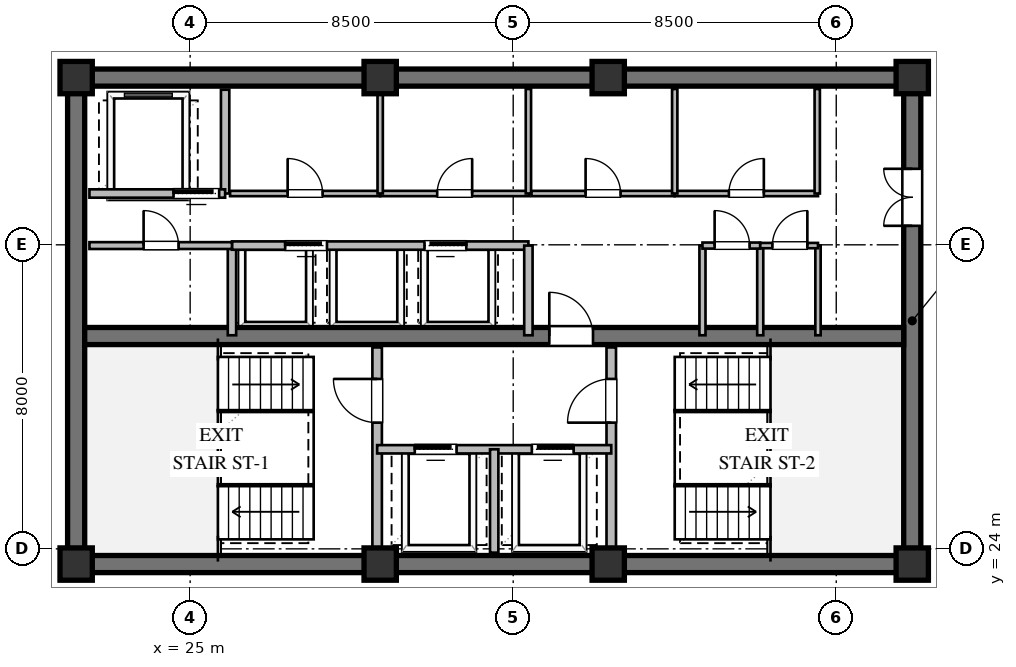
"""IFC4 building model, lengths in metres.
Left out: names, types, materials, properties, quantities, classifications, styles, units other than length and angle.
Written with IfcOpenShell. Run it as: python <this file> out.ifc"""

import sys

from ifc_helpers import new_model, si_unit, direction, frame, frame_2d, origin, origin_2d, place, context, subcontext, project, spatial, rectangle, extrude, element, fill, save


model = new_model("IFC4")
c1 = context("Model", 3, precision=1e-05, world=origin(), true_north=direction((0.0, 1.0)))
c2 = subcontext(c1, "Body", "Model", "MODEL_VIEW")
j1 = project(units=[si_unit("LENGTHUNIT", "METRE"), si_unit("PLANEANGLEUNIT", "RADIAN")], contexts=[c1])
p1 = place(None, origin())
s1 = spatial("IfcSite", under=j1, at=p1, CompositionType="ELEMENT")
p2 = place(p1, origin())
s2 = spatial("IfcBuilding", under=s1, at=p2, CompositionType="ELEMENT")
p3 = place(p2, frame((0.0, 0.0, 228.0)))
s3 = spatial("IfcBuildingStorey", under=s2, at=p3, CompositionType="ELEMENT", Elevation=228.0)
for number, where, z_axis, x_axis in (
    (1, (21.775, 23.6, 0.0), (0.0, 0.0, 1.0), (1.0, 0.0, 0.0)),
    (2, (21.775, 36.4, 0.0), (0.0, 0.0, 1.0), (1.0, 0.0, 0.0)),
):
    element("IfcWall", number, at=place(p3, frame(where, z_axis=z_axis, x_axis=x_axis)), inside=s3, PredefinedType="SHEAR", context=c2, shape_type="SweptSolid", body=[
        extrude(rectangle(XDim=22.45, YDim=0.45, at=frame_2d((11.225, 0.0))), origin(), (0.0, 0.0, 1.0), 3.36),
    ])
p4 = place(p3, frame((22.0, 23.825, 0.0), z_axis=(0.0, 0.0, 1.0), x_axis=(0.0, 1.0, 0.0)))
e3 = element("IfcWall", 3, at=p4, inside=s3, PredefinedType="SHEAR", context=c2, shape_type="SweptSolid", body=[
    extrude(rectangle(XDim=12.35, YDim=0.45, at=frame_2d((6.175, 0.0))), origin(), (0.0, 0.0, 1.0), 3.36),
])
p5 = place(p3, frame((44.0, 23.825, 0.0), z_axis=(0.0, 0.0, 1.0), x_axis=(0.0, 1.0, 0.0)))
e4 = element("IfcWall", 4, at=p5, inside=s3, PredefinedType="SHEAR", context=c2, shape_type="SweptSolid", body=[
    extrude(rectangle(XDim=12.35, YDim=0.45, at=frame_2d((6.175, 0.0))), origin(), (0.0, 0.0, 1.0), 3.36),
])
p6 = place(p5, frame((8.675, 0.0, 0.0)))
e5 = element("IfcOpeningElement", 5, at=p6, cuts=e4, PredefinedType="OPENING", context=c2, shape_type="SweptSolid", body=[
    extrude(rectangle(XDim=1.5, YDim=2.15, at=frame_2d((0.75, 1.075))), frame((0.0, 0.235, 0.0), z_axis=(0.0, -1.0, 0.0), x_axis=(1.0, 0.0, 0.0)), (0.0, 0.0, 1.0), 0.47),
])
p7 = place(p3, frame((22.225, 29.6, 0.0), z_axis=(0.0, 0.0, 1.0), x_axis=(1.0, 0.0, 0.0)))
e6 = element("IfcWall", 6, at=p7, inside=s3, PredefinedType="SHEAR", context=c2, shape_type="SweptSolid", body=[
    extrude(rectangle(XDim=21.55, YDim=0.45, at=frame_2d((10.775, 0.0))), origin(), (0.0, 0.0, 1.0), 3.36),
])
p8 = place(p7, frame((12.225, 0.0, 0.0)))
e7 = element("IfcOpeningElement", 7, at=p8, cuts=e6, PredefinedType="OPENING", context=c2, shape_type="SweptSolid", body=[
    extrude(rectangle(XDim=1.15, YDim=2.1, at=frame_2d((0.575, 1.05))), frame((0.0, 0.235, 0.0), z_axis=(0.0, -1.0, 0.0), x_axis=(1.0, 0.0, 0.0)), (0.0, 0.0, 1.0), 0.47),
])
for number, where, z_axis, x_axis in (
    (8, (22.0, 23.6, 0.0), (0.0, 0.0, 1.0), (1.0, 0.0, 0.0)),
    (9, (30.0, 23.6, 0.0), (0.0, 0.0, 1.0), (1.0, 0.0, 0.0)),
    (10, (36.0, 23.6, 0.0), (0.0, 0.0, 1.0), (1.0, 0.0, 0.0)),
    (11, (44.0, 23.6, 0.0), (0.0, 0.0, 1.0), (1.0, 0.0, 0.0)),
    (12, (44.0, 36.4, 0.0), (0.0, 0.0, 1.0), (1.0, 0.0, 0.0)),
    (13, (36.0, 36.4, 0.0), (0.0, 0.0, 1.0), (1.0, 0.0, 0.0)),
    (14, (30.0, 36.4, 0.0), (0.0, 0.0, 1.0), (1.0, 0.0, 0.0)),
    (15, (22.0, 36.4, 0.0), (0.0, 0.0, 1.0), (1.0, 0.0, 0.0)),
):
    element("IfcColumn", number, at=place(p3, frame(where, z_axis=z_axis, x_axis=x_axis)), inside=s3, PredefinedType="COLUMN", context=c2, shape_type="SweptSolid", body=[
        extrude(rectangle(XDim=0.85, YDim=0.85, at=origin_2d()), origin(), (0.0, 0.0, 1.0), 3.6),
    ])
p9 = place(p3, frame((29.92, 23.9, 0.0), z_axis=(0.0, 0.0, 1.0), x_axis=(0.0, 1.0, 0.0)))
e16 = element("IfcWall", 16, at=p9, inside=s3, PredefinedType="SOLIDWALL", context=c2, shape_type="SweptSolid", body=[
    extrude(rectangle(XDim=5.4, YDim=0.25, at=frame_2d((2.7, 0.0))), origin(), (0.0, 0.0, 1.0), 3.36),
])
p10 = place(p9, frame((3.421, 0.0, 0.0)))
e17 = element("IfcOpeningElement", 17, at=p10, cuts=e16, PredefinedType="OPENING", context=c2, shape_type="SweptSolid", body=[
    extrude(rectangle(XDim=1.15, YDim=2.1, at=frame_2d((0.575, 1.05))), frame((0.0, 0.135, 0.0), z_axis=(0.0, -1.0, 0.0), x_axis=(1.0, 0.0, 0.0)), (0.0, 0.0, 1.0), 0.27),
])
p11 = place(p3, frame((36.08, 23.9, 0.0), z_axis=(0.0, 0.0, 1.0), x_axis=(0.0, 1.0, 0.0)))
e18 = element("IfcWall", 18, at=p11, inside=s3, PredefinedType="SOLIDWALL", context=c2, shape_type="SweptSolid", body=[
    extrude(rectangle(XDim=5.4, YDim=0.25, at=frame_2d((2.7, 0.0))), origin(), (0.0, 0.0, 1.0), 3.36),
])
p12 = place(p11, frame((3.421, 0.0, 0.0)))
e19 = element("IfcOpeningElement", 19, at=p12, cuts=e18, PredefinedType="OPENING", context=c2, shape_type="SweptSolid", body=[
    extrude(rectangle(XDim=1.15, YDim=2.1, at=frame_2d((0.575, 1.05))), frame((0.0, 0.135, 0.0), z_axis=(0.0, -1.0, 0.0), x_axis=(1.0, 0.0, 0.0)), (0.0, 0.0, 1.0), 0.27),
])
p13 = place(p3, frame((29.92, 26.62, 0.0), z_axis=(0.0, 0.0, 1.0), x_axis=(1.0, 0.0, 0.0)))
e20 = element("IfcWall", 20, at=p13, inside=s3, PredefinedType="SOLIDWALL", context=c2, shape_type="SweptSolid", body=[
    extrude(rectangle(XDim=6.16, YDim=0.22, at=frame_2d((3.08, 0.0))), origin(), (0.0, 0.0, 1.0), 3.36),
])
p14 = place(p13, frame((0.99, 0.0, 0.0)))
e21 = element("IfcOpeningElement", 21, at=p14, cuts=e20, PredefinedType="OPENING", context=c2, shape_type="SweptSolid", body=[
    extrude(rectangle(XDim=1.1, YDim=2.1, at=frame_2d((0.55, 1.05))), frame((0.0, 0.12, 0.0), z_axis=(0.0, -1.0, 0.0), x_axis=(1.0, 0.0, 0.0)), (0.0, 0.0, 1.0), 0.24),
])
p15 = place(p13, frame((4.07, 0.0, 0.0)))
e22 = element("IfcOpeningElement", 22, at=p15, cuts=e20, PredefinedType="OPENING", context=c2, shape_type="SweptSolid", body=[
    extrude(rectangle(XDim=1.1, YDim=2.1, at=frame_2d((0.55, 1.05))), frame((0.0, 0.12, 0.0), z_axis=(0.0, -1.0, 0.0), x_axis=(1.0, 0.0, 0.0)), (0.0, 0.0, 1.0), 0.24),
])
p16 = place(p3, frame((33.0, 23.9, 0.0), z_axis=(0.0, 0.0, 1.0), x_axis=(0.0, 1.0, 0.0)))
e23 = element("IfcWall", 23, at=p16, inside=s3, PredefinedType="SOLIDWALL", context=c2, shape_type="SweptSolid", body=[
    extrude(rectangle(XDim=2.72, YDim=0.22, at=frame_2d((1.36, 0.0))), origin(), (0.0, 0.0, 1.0), 3.36),
])
p17 = place(p3, frame((25.92, 33.35, 0.0), z_axis=(0.0, 0.0, 1.0), x_axis=(0.0, 1.0, 0.0)))
e24 = element("IfcWall", 24, at=p17, inside=s3, PredefinedType="SOLIDWALL", context=c2, shape_type="SweptSolid", body=[
    extrude(rectangle(XDim=2.73, YDim=0.22, at=frame_2d((1.365, 0.0))), origin(), (0.0, 0.0, 1.0), 3.36),
])
p18 = place(p3, frame((22.35, 33.35, 0.0), z_axis=(0.0, 0.0, 1.0), x_axis=(1.0, 0.0, 0.0)))
e25 = element("IfcWall", 25, at=p18, inside=s3, PredefinedType="SOLIDWALL", context=c2, shape_type="SweptSolid", body=[
    extrude(rectangle(XDim=3.57, YDim=0.22, at=frame_2d((1.785, 0.0))), origin(), (0.0, 0.0, 1.0), 3.36),
])
p19 = place(p18, frame((2.213, 0.0, 0.0)))
e26 = element("IfcOpeningElement", 26, at=p19, cuts=e25, PredefinedType="OPENING", context=c2, shape_type="SweptSolid", body=[
    extrude(rectangle(XDim=1.2, YDim=2.1, at=frame_2d((0.6, 1.05))), frame((0.0, 0.12, 0.0), z_axis=(0.0, -1.0, 0.0), x_axis=(1.0, 0.0, 0.0)), (0.0, 0.0, 1.0), 0.24),
])
p20 = place(p3, frame((26.1, 29.62, 0.0), z_axis=(0.0, 0.0, 1.0), x_axis=(0.0, 1.0, 0.0)))
e27 = element("IfcWall", 27, at=p20, inside=s3, PredefinedType="SOLIDWALL", context=c2, shape_type="SweptSolid", body=[
    extrude(rectangle(XDim=2.36, YDim=0.22, at=frame_2d((1.18, 0.0))), origin(), (0.0, 0.0, 1.0), 3.36),
])
p21 = place(p3, frame((26.1, 31.98, 0.0), z_axis=(0.0, 0.0, 1.0), x_axis=(1.0, 0.0, 0.0)))
e28 = element("IfcWall", 28, at=p21, inside=s3, PredefinedType="SOLIDWALL", context=c2, shape_type="SweptSolid", body=[
    extrude(rectangle(XDim=7.8, YDim=0.22, at=frame_2d((3.9, 0.0))), origin(), (0.0, 0.0, 1.0), 3.36),
])
p22 = place(p21, frame((1.4, 0.0, 0.0)))
e29 = element("IfcOpeningElement", 29, at=p22, cuts=e28, PredefinedType="OPENING", context=c2, shape_type="SweptSolid", body=[
    extrude(rectangle(XDim=1.1, YDim=2.1, at=frame_2d((0.55, 1.05))), frame((0.0, 0.12, 0.0), z_axis=(0.0, -1.0, 0.0), x_axis=(1.0, 0.0, 0.0)), (0.0, 0.0, 1.0), 0.24),
])
p23 = place(p21, frame((5.066, 0.0, 0.0)))
e30 = element("IfcOpeningElement", 30, at=p23, cuts=e28, PredefinedType="OPENING", context=c2, shape_type="SweptSolid", body=[
    extrude(rectangle(XDim=1.1, YDim=2.1, at=frame_2d((0.55, 1.05))), frame((0.0, 0.12, 0.0), z_axis=(0.0, -1.0, 0.0), x_axis=(1.0, 0.0, 0.0)), (0.0, 0.0, 1.0), 0.24),
])
p24 = place(p3, frame((33.9, 29.62, 0.0), z_axis=(0.0, 0.0, 1.0), x_axis=(0.0, 1.0, 0.0)))
e31 = element("IfcWall", 31, at=p24, inside=s3, PredefinedType="SOLIDWALL", context=c2, shape_type="SweptSolid", body=[
    extrude(rectangle(XDim=2.36, YDim=0.22, at=frame_2d((1.18, 0.0))), origin(), (0.0, 0.0, 1.0), 3.36),
])
p25 = place(p3, frame((26.05, 33.35, 0.0), z_axis=(0.0, 0.0, 1.0), x_axis=(1.0, 0.0, 0.0)))
e32 = element("IfcWall", 32, at=p25, inside=s3, PredefinedType="PARTITIONING", context=c2, shape_type="SweptSolid", body=[
    extrude(rectangle(XDim=3.95, YDim=0.14, at=frame_2d((1.975, 0.0))), origin(), (0.0, 0.0, 1.0), 3.36),
])
p26 = place(p25, frame((1.515, 0.0, 0.0)))
e33 = element("IfcOpeningElement", 33, at=p26, cuts=e32, PredefinedType="OPENING", context=c2, shape_type="SweptSolid", body=[
    extrude(rectangle(XDim=0.92, YDim=2.1, at=frame_2d((0.46, 1.05))), frame((0.0, 0.08, 0.0), z_axis=(0.0, -1.0, 0.0), x_axis=(1.0, 0.0, 0.0)), (0.0, 0.0, 1.0), 0.16),
])
p27 = place(p3, frame((30.0, 33.35, 0.0), z_axis=(0.0, 0.0, 1.0), x_axis=(1.0, 0.0, 0.0)))
e34 = element("IfcWall", 34, at=p27, inside=s3, PredefinedType="PARTITIONING", context=c2, shape_type="SweptSolid", body=[
    extrude(rectangle(XDim=3.92, YDim=0.14, at=frame_2d((1.96, 0.0))), origin(), (0.0, 0.0, 1.0), 3.36),
])
p28 = place(p27, frame((1.5, 0.0, 0.0)))
e35 = element("IfcOpeningElement", 35, at=p28, cuts=e34, PredefinedType="OPENING", context=c2, shape_type="SweptSolid", body=[
    extrude(rectangle(XDim=0.92, YDim=2.1, at=frame_2d((0.46, 1.05))), frame((0.0, 0.08, 0.0), z_axis=(0.0, -1.0, 0.0), x_axis=(1.0, 0.0, 0.0)), (0.0, 0.0, 1.0), 0.16),
])
for number, where, z_axis, x_axis in (
    (36, (30.0, 33.35, 0.0), (0.0, 0.0, 1.0), (0.0, 1.0, 0.0)),
    (37, (33.9, 33.35, 0.0), (0.0, 0.0, 1.0), (0.0, 1.0, 0.0)),
):
    element("IfcWall", number, at=place(p3, frame(where, z_axis=z_axis, x_axis=x_axis)), inside=s3, PredefinedType="PARTITIONING", context=c2, shape_type="SweptSolid", body=[
        extrude(rectangle(XDim=2.75, YDim=0.14, at=frame_2d((1.375, 0.0))), origin(), (0.0, 0.0, 1.0), 3.36),
    ])
p29 = place(p3, frame((33.98, 33.35, 0.0), z_axis=(0.0, 0.0, 1.0), x_axis=(1.0, 0.0, 0.0)))
e38 = element("IfcWall", 38, at=p29, inside=s3, PredefinedType="PARTITIONING", context=c2, shape_type="SweptSolid", body=[
    extrude(rectangle(XDim=3.77, YDim=0.14, at=frame_2d((1.885, 0.0))), origin(), (0.0, 0.0, 1.0), 3.36),
])
p30 = place(p29, frame((1.425, 0.0, 0.0)))
e39 = element("IfcOpeningElement", 39, at=p30, cuts=e38, PredefinedType="OPENING", context=c2, shape_type="SweptSolid", body=[
    extrude(rectangle(XDim=0.92, YDim=2.1, at=frame_2d((0.46, 1.05))), frame((0.0, 0.08, 0.0), z_axis=(0.0, -1.0, 0.0), x_axis=(1.0, 0.0, 0.0)), (0.0, 0.0, 1.0), 0.16),
])
p31 = place(p3, frame((37.75, 33.35, 0.0), z_axis=(0.0, 0.0, 1.0), x_axis=(1.0, 0.0, 0.0)))
e40 = element("IfcWall", 40, at=p31, inside=s3, PredefinedType="PARTITIONING", context=c2, shape_type="SweptSolid", body=[
    extrude(rectangle(XDim=3.77, YDim=0.14, at=frame_2d((1.885, 0.0))), origin(), (0.0, 0.0, 1.0), 3.36),
])
p32 = place(p31, frame((1.425, 0.0, 0.0)))
e41 = element("IfcOpeningElement", 41, at=p32, cuts=e40, PredefinedType="OPENING", context=c2, shape_type="SweptSolid", body=[
    extrude(rectangle(XDim=0.92, YDim=2.1, at=frame_2d((0.46, 1.05))), frame((0.0, 0.08, 0.0), z_axis=(0.0, -1.0, 0.0), x_axis=(1.0, 0.0, 0.0)), (0.0, 0.0, 1.0), 0.16),
])
for number, where, z_axis, x_axis in (
    (42, (37.75, 33.35, 0.0), (0.0, 0.0, 1.0), (0.0, 1.0, 0.0)),
    (43, (41.5, 33.35, 0.0), (0.0, 0.0, 1.0), (0.0, 1.0, 0.0)),
):
    element("IfcWall", number, at=place(p3, frame(where, z_axis=z_axis, x_axis=x_axis)), inside=s3, PredefinedType="PARTITIONING", context=c2, shape_type="SweptSolid", body=[
        extrude(rectangle(XDim=2.75, YDim=0.14, at=frame_2d((1.375, 0.0))), origin(), (0.0, 0.0, 1.0), 3.36),
    ])
p33 = place(p3, frame((22.35, 31.98, 0.0), z_axis=(0.0, 0.0, 1.0), x_axis=(1.0, 0.0, 0.0)))
e44 = element("IfcWall", 44, at=p33, inside=s3, PredefinedType="PARTITIONING", context=c2, shape_type="SweptSolid", body=[
    extrude(rectangle(XDim=3.75, YDim=0.18, at=frame_2d((1.875, 0.0))), origin(), (0.0, 0.0, 1.0), 3.36),
])
p34 = place(p33, frame((1.425, 0.0, 0.0)))
e45 = element("IfcOpeningElement", 45, at=p34, cuts=e44, PredefinedType="OPENING", context=c2, shape_type="SweptSolid", body=[
    extrude(rectangle(XDim=0.92, YDim=2.1, at=frame_2d((0.46, 1.05))), frame((0.0, 0.1, 0.0), z_axis=(0.0, -1.0, 0.0), x_axis=(1.0, 0.0, 0.0)), (0.0, 0.0, 1.0), 0.2),
])
for number, where, z_axis, x_axis in (
    (46, (38.48, 29.62, 0.0), (0.0, 0.0, 1.0), (0.0, 1.0, 0.0)),
    (47, (40.0, 29.62, 0.0), (0.0, 0.0, 1.0), (0.0, 1.0, 0.0)),
):
    element("IfcWall", number, at=place(p3, frame(where, z_axis=z_axis, x_axis=x_axis)), inside=s3, PredefinedType="PLUMBINGWALL", context=c2, shape_type="SweptSolid", body=[
        extrude(rectangle(XDim=2.36, YDim=0.16, at=frame_2d((1.18, 0.0))), origin(), (0.0, 0.0, 1.0), 3.36),
    ])
p35 = place(p3, frame((41.52, 29.62, 0.0), z_axis=(0.0, 0.0, 1.0), x_axis=(0.0, 1.0, 0.0)))
e48 = element("IfcWall", 48, at=p35, inside=s3, PredefinedType="PARTITIONING", context=c2, shape_type="SweptSolid", body=[
    extrude(rectangle(XDim=2.36, YDim=0.14, at=frame_2d((1.18, 0.0))), origin(), (0.0, 0.0, 1.0), 3.36),
])
p36 = place(p3, frame((38.48, 31.98, 0.0), z_axis=(0.0, 0.0, 1.0), x_axis=(1.0, 0.0, 0.0)))
e49 = element("IfcWall", 49, at=p36, inside=s3, PredefinedType="PLUMBINGWALL", context=c2, shape_type="SweptSolid", body=[
    extrude(rectangle(XDim=1.52, YDim=0.16, at=frame_2d((0.76, 0.0))), origin(), (0.0, 0.0, 1.0), 3.36),
])
p37 = place(p36, frame((0.32, 0.0, 0.0)))
e50 = element("IfcOpeningElement", 50, at=p37, cuts=e49, PredefinedType="OPENING", context=c2, shape_type="SweptSolid", body=[
    extrude(rectangle(XDim=0.92, YDim=2.1, at=frame_2d((0.46, 1.05))), frame((0.0, 0.09, 0.0), z_axis=(0.0, -1.0, 0.0), x_axis=(1.0, 0.0, 0.0)), (0.0, 0.0, 1.0), 0.18),
])
p38 = place(p3, frame((40.0, 31.98, 0.0), z_axis=(0.0, 0.0, 1.0), x_axis=(1.0, 0.0, 0.0)))
e51 = element("IfcWall", 51, at=p38, inside=s3, PredefinedType="PARTITIONING", context=c2, shape_type="SweptSolid", body=[
    extrude(rectangle(XDim=1.52, YDim=0.14, at=frame_2d((0.76, 0.0))), origin(), (0.0, 0.0, 1.0), 3.36),
])
p39 = place(p38, frame((0.32, 0.0, 0.0)))
e52 = element("IfcOpeningElement", 52, at=p39, cuts=e51, PredefinedType="OPENING", context=c2, shape_type="SweptSolid", body=[
    extrude(rectangle(XDim=0.92, YDim=2.1, at=frame_2d((0.46, 1.05))), frame((0.0, 0.08, 0.0), z_axis=(0.0, -1.0, 0.0), x_axis=(1.0, 0.0, 0.0)), (0.0, 0.0, 1.0), 0.16),
])
p40 = place(p10, origin())
e53 = element("IfcDoor", 53, at=p40, inside=s3, OperationType="SINGLE_SWING_RIGHT", PredefinedType="DOOR", context=c2, shape_type="SweptSolid", body=[
    extrude(rectangle(XDim=1.15, YDim=2.1, at=frame_2d((0.575, 1.05))), frame((0.0, 0.025, 0.0), z_axis=(0.0, -1.0, 0.0), x_axis=(1.0, 0.0, 0.0)), (0.0, 0.0, 1.0), 0.05),
])
fill(e17, e53)
p41 = place(p12, origin())
e54 = element("IfcDoor", 54, at=p41, inside=s3, OperationType="SINGLE_SWING_LEFT", PredefinedType="DOOR", context=c2, shape_type="SweptSolid", body=[
    extrude(rectangle(XDim=1.15, YDim=2.1, at=frame_2d((0.575, 1.05))), frame((0.0, 0.025, 0.0), z_axis=(0.0, -1.0, 0.0), x_axis=(1.0, 0.0, 0.0)), (0.0, 0.0, 1.0), 0.05),
])
fill(e19, e54)
p42 = place(p14, origin())
e55 = element("IfcDoor", 55, at=p42, inside=s3, OperationType="SLIDING_TO_LEFT", PredefinedType="DOOR", context=c2, shape_type="SweptSolid", body=[
    extrude(rectangle(XDim=1.1, YDim=2.1, at=frame_2d((0.55, 1.05))), frame((0.0, 0.025, 0.0), z_axis=(0.0, -1.0, 0.0), x_axis=(1.0, 0.0, 0.0)), (0.0, 0.0, 1.0), 0.05),
])
fill(e21, e55)
p43 = place(p15, origin())
e56 = element("IfcDoor", 56, at=p43, inside=s3, OperationType="SLIDING_TO_RIGHT", PredefinedType="DOOR", context=c2, shape_type="SweptSolid", body=[
    extrude(rectangle(XDim=1.1, YDim=2.1, at=frame_2d((0.55, 1.05))), frame((0.0, 0.025, 0.0), z_axis=(0.0, -1.0, 0.0), x_axis=(1.0, 0.0, 0.0)), (0.0, 0.0, 1.0), 0.05),
])
fill(e22, e56)
p44 = place(p8, origin())
e57 = element("IfcDoor", 57, at=p44, inside=s3, OperationType="SINGLE_SWING_LEFT", PredefinedType="DOOR", context=c2, shape_type="SweptSolid", body=[
    extrude(rectangle(XDim=1.15, YDim=2.1, at=frame_2d((0.575, 1.05))), frame((0.0, 0.025, 0.0), z_axis=(0.0, -1.0, 0.0), x_axis=(1.0, 0.0, 0.0)), (0.0, 0.0, 1.0), 0.05),
])
fill(e7, e57)
p45 = place(p6, origin())
e58 = element("IfcDoor", 58, at=p45, inside=s3, OperationType="DOUBLE_DOOR_SINGLE_SWING", PredefinedType="DOOR", context=c2, shape_type="SweptSolid", body=[
    extrude(rectangle(XDim=1.5, YDim=2.15, at=frame_2d((0.75, 1.075))), frame((0.0, 0.025, 0.0), z_axis=(0.0, -1.0, 0.0), x_axis=(1.0, 0.0, 0.0)), (0.0, 0.0, 1.0), 0.05),
])
fill(e5, e58)
p46 = place(p19, origin())
e59 = element("IfcDoor", 59, at=p46, inside=s3, OperationType="SLIDING_TO_LEFT", PredefinedType="DOOR", context=c2, shape_type="SweptSolid", body=[
    extrude(rectangle(XDim=1.2, YDim=2.1, at=frame_2d((0.6, 1.05))), frame((0.0, 0.025, 0.0), z_axis=(0.0, -1.0, 0.0), x_axis=(1.0, 0.0, 0.0)), (0.0, 0.0, 1.0), 0.05),
])
fill(e26, e59)
p47 = place(p22, origin())
e60 = element("IfcDoor", 60, at=p47, inside=s3, OperationType="SLIDING_TO_LEFT", PredefinedType="DOOR", context=c2, shape_type="SweptSolid", body=[
    extrude(rectangle(XDim=1.1, YDim=2.1, at=frame_2d((0.55, 1.05))), frame((0.0, 0.025, 0.0), z_axis=(0.0, -1.0, 0.0), x_axis=(1.0, 0.0, 0.0)), (0.0, 0.0, 1.0), 0.05),
])
fill(e29, e60)
p48 = place(p23, origin())
e61 = element("IfcDoor", 61, at=p48, inside=s3, OperationType="SLIDING_TO_RIGHT", PredefinedType="DOOR", context=c2, shape_type="SweptSolid", body=[
    extrude(rectangle(XDim=1.1, YDim=2.1, at=frame_2d((0.55, 1.05))), frame((0.0, 0.025, 0.0), z_axis=(0.0, -1.0, 0.0), x_axis=(1.0, 0.0, 0.0)), (0.0, 0.0, 1.0), 0.05),
])
fill(e30, e61)
p49 = place(p26, origin())
e62 = element("IfcDoor", 62, at=p49, inside=s3, OperationType="SINGLE_SWING_LEFT", PredefinedType="DOOR", context=c2, shape_type="SweptSolid", body=[
    extrude(rectangle(XDim=0.92, YDim=2.1, at=frame_2d((0.46, 1.05))), frame((0.0, 0.025, 0.0), z_axis=(0.0, -1.0, 0.0), x_axis=(1.0, 0.0, 0.0)), (0.0, 0.0, 1.0), 0.05),
])
fill(e33, e62)
p50 = place(p28, origin())
e63 = element("IfcDoor", 63, at=p50, inside=s3, OperationType="SINGLE_SWING_RIGHT", PredefinedType="DOOR", context=c2, shape_type="SweptSolid", body=[
    extrude(rectangle(XDim=0.92, YDim=2.1, at=frame_2d((0.46, 1.05))), frame((0.0, 0.025, 0.0), z_axis=(0.0, -1.0, 0.0), x_axis=(1.0, 0.0, 0.0)), (0.0, 0.0, 1.0), 0.05),
])
fill(e35, e63)
p51 = place(p30, origin())
e64 = element("IfcDoor", 64, at=p51, inside=s3, OperationType="SINGLE_SWING_LEFT", PredefinedType="DOOR", context=c2, shape_type="SweptSolid", body=[
    extrude(rectangle(XDim=0.92, YDim=2.1, at=frame_2d((0.46, 1.05))), frame((0.0, 0.025, 0.0), z_axis=(0.0, -1.0, 0.0), x_axis=(1.0, 0.0, 0.0)), (0.0, 0.0, 1.0), 0.05),
])
fill(e39, e64)
p52 = place(p32, origin())
e65 = element("IfcDoor", 65, at=p52, inside=s3, OperationType="SINGLE_SWING_RIGHT", PredefinedType="DOOR", context=c2, shape_type="SweptSolid", body=[
    extrude(rectangle(XDim=0.92, YDim=2.1, at=frame_2d((0.46, 1.05))), frame((0.0, 0.025, 0.0), z_axis=(0.0, -1.0, 0.0), x_axis=(1.0, 0.0, 0.0)), (0.0, 0.0, 1.0), 0.05),
])
fill(e41, e65)
p53 = place(p34, origin())
e66 = element("IfcDoor", 66, at=p53, inside=s3, OperationType="SINGLE_SWING_LEFT", PredefinedType="DOOR", context=c2, shape_type="SweptSolid", body=[
    extrude(rectangle(XDim=0.92, YDim=2.1, at=frame_2d((0.46, 1.05))), frame((0.0, 0.025, 0.0), z_axis=(0.0, -1.0, 0.0), x_axis=(1.0, 0.0, 0.0)), (0.0, 0.0, 1.0), 0.05),
])
fill(e45, e66)
p54 = place(p37, origin())
e67 = element("IfcDoor", 67, at=p54, inside=s3, OperationType="SINGLE_SWING_LEFT", PredefinedType="DOOR", context=c2, shape_type="SweptSolid", body=[
    extrude(rectangle(XDim=0.92, YDim=2.1, at=frame_2d((0.46, 1.05))), frame((0.0, 0.025, 0.0), z_axis=(0.0, -1.0, 0.0), x_axis=(1.0, 0.0, 0.0)), (0.0, 0.0, 1.0), 0.05),
])
fill(e50, e67)
p55 = place(p39, origin())
e68 = element("IfcDoor", 68, at=p55, inside=s3, OperationType="SINGLE_SWING_RIGHT", PredefinedType="DOOR", context=c2, shape_type="SweptSolid", body=[
    extrude(rectangle(XDim=0.92, YDim=2.1, at=frame_2d((0.46, 1.05))), frame((0.0, 0.025, 0.0), z_axis=(0.0, -1.0, 0.0), x_axis=(1.0, 0.0, 0.0)), (0.0, 0.0, 1.0), 0.05),
])
fill(e52, e68)
save(model, sys.argv[1])
